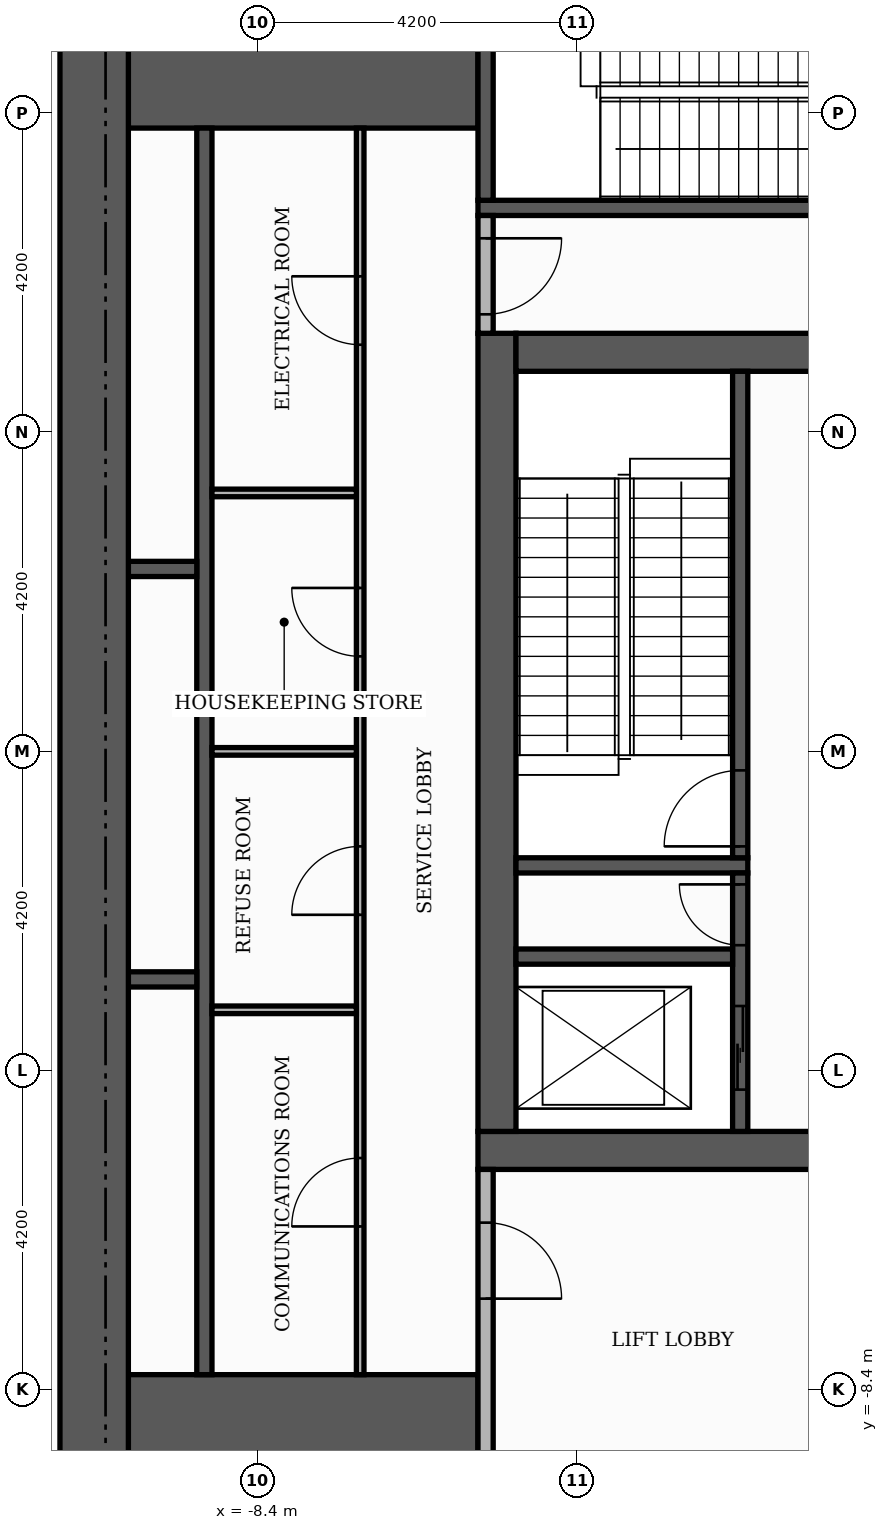
"""IFC4 building model, lengths in metres.
Left out: names, types, materials, properties, quantities, classifications, styles, units other than length and angle.
Written with IfcOpenShell. Run it as: python <this file> out.ifc"""

import sys

from ifc_helpers import new_model, si_unit, direction, frame, frame_2d, origin, place, context, subcontext, project, spatial, rectangle, extrude, element, fill, save


model = new_model("IFC4")
c1 = context("Model", 3, precision=1e-05, world=origin(), true_north=direction((0.0, 1.0)))
c2 = subcontext(c1, "Body", "Model", "MODEL_VIEW")
j1 = project(units=[si_unit("LENGTHUNIT", "METRE"), si_unit("PLANEANGLEUNIT", "RADIAN")], contexts=[c1])
p1 = place(None, origin())
s1 = spatial("IfcSite", under=j1, at=p1, CompositionType="ELEMENT")
p2 = place(p1, origin())
s2 = spatial("IfcBuilding", under=s1, at=p2, CompositionType="ELEMENT")
p3 = place(p2, frame((0.0, 0.0, 287.4)))
s3 = spatial("IfcBuildingStorey", under=s2, at=p3, CompositionType="ELEMENT", Elevation=287.4)
p4 = place(p3, frame((-5.5, -5.25, 0.0), z_axis=(0.0, 0.0, 1.0), x_axis=(1.0, 0.0, 0.0)))
e1 = element("IfcWall", 1, at=p4, inside=s3, PredefinedType="SHEAR", context=c2, shape_type="SweptSolid", body=[
    extrude(rectangle(XDim=11.0, YDim=0.5, at=frame_2d((5.5, 0.0))), origin(), (0.0, 0.0, 1.0), 5.05),
])
p5 = place(p4, frame((4.9, 0.0, 0.0)))
e2 = element("IfcOpeningElement", 2, at=p5, cuts=e1, PredefinedType="OPENING", context=c2, shape_type="SweptSolid", body=[
    extrude(rectangle(XDim=1.2, YDim=2.1, at=frame_2d((0.6, 1.05))), frame((0.0, 0.26, 0.0), z_axis=(0.0, -1.0, 0.0), x_axis=(1.0, 0.0, 0.0)), (0.0, 0.0, 1.0), 0.52),
])
p6 = place(p3, frame((-5.25, -5.0, 0.0), z_axis=(0.0, 0.0, 1.0), x_axis=(0.0, 1.0, 0.0)))
e3 = element("IfcWall", 3, at=p6, inside=s3, PredefinedType="SHEAR", context=c2, shape_type="SweptSolid", body=[
    extrude(rectangle(XDim=10.5, YDim=0.5, at=frame_2d((5.25, 0.0))), origin(), (0.0, 0.0, 1.0), 5.05),
])
p7 = place(p3, frame((-5.0, 5.25, 0.0), z_axis=(0.0, 0.0, 1.0), x_axis=(1.0, 0.0, 0.0)))
e4 = element("IfcWall", 4, at=p7, inside=s3, PredefinedType="SHEAR", context=c2, shape_type="SweptSolid", body=[
    extrude(rectangle(XDim=10.0, YDim=0.5, at=frame_2d((5.0, 0.0))), origin(), (0.0, 0.0, 1.0), 5.05),
])
p8 = place(p7, frame((4.4, 0.0, 0.0)))
e5 = element("IfcOpeningElement", 5, at=p8, cuts=e4, PredefinedType="OPENING", context=c2, shape_type="SweptSolid", body=[
    extrude(rectangle(XDim=1.2, YDim=2.1, at=frame_2d((0.6, 1.05))), frame((0.0, 0.26, 0.0), z_axis=(0.0, -1.0, 0.0), x_axis=(1.0, 0.0, 0.0)), (0.0, 0.0, 1.0), 0.52),
])
for number, where, z_axis, x_axis in (
    (6, (-10.1, -9.15, 0.0), (0.0, 0.0, 1.0), (1.0, 0.0, 0.0)),
    (7, (-10.1, 9.15, 0.0), (0.0, 0.0, 1.0), (1.0, 0.0, 0.0)),
):
    element("IfcWall", number, at=place(p3, frame(where, z_axis=z_axis, x_axis=x_axis)), inside=s3, PredefinedType="SHEAR", context=c2, shape_type="SweptSolid", body=[
        extrude(rectangle(XDim=4.6, YDim=1.9, at=frame_2d((2.3, 0.0))), origin(), (0.0, 0.0, 1.0), 5.05),
    ])
p9 = place(p3, frame((-5.0, -1.5, 0.0), z_axis=(0.0, 0.0, 1.0), x_axis=(1.0, 0.0, 0.0)))
e8 = element("IfcWall", 8, at=p9, inside=s3, PredefinedType="SHEAR", context=c2, shape_type="SweptSolid", body=[
    extrude(rectangle(XDim=3.05, YDim=0.2, at=frame_2d((1.525, 0.0))), origin(), (0.0, 0.0, 1.0), 5.05),
])
p10 = place(p3, frame((-2.05, -1.4, 0.0), z_axis=(0.0, 0.0, 1.0), x_axis=(0.0, 1.0, 0.0)))
e9 = element("IfcWall", 9, at=p10, inside=s3, PredefinedType="SHEAR", context=c2, shape_type="SweptSolid", body=[
    extrude(rectangle(XDim=6.4, YDim=0.2, at=frame_2d((3.2, 0.0))), origin(), (0.0, 0.0, 1.0), 5.05),
])
p11 = place(p10, frame((0.15, 0.0, 0.0)))
e10 = element("IfcOpeningElement", 10, at=p11, cuts=e9, PredefinedType="OPENING", context=c2, shape_type="SweptSolid", body=[
    extrude(rectangle(XDim=1.0, YDim=2.1, at=frame_2d((0.5, 1.05))), frame((0.0, 0.11, 0.0), z_axis=(0.0, -1.0, 0.0), x_axis=(1.0, 0.0, 0.0)), (0.0, 0.0, 1.0), 0.22),
])
p12 = place(p3, frame((-5.5, 7.15, 0.0), z_axis=(0.0, 0.0, 1.0), x_axis=(1.0, 0.0, 0.0)))
e11 = element("IfcWall", 11, at=p12, inside=s3, PredefinedType="SHEAR", context=c2, shape_type="SweptSolid", body=[
    extrude(rectangle(XDim=6.8, YDim=0.2, at=frame_2d((3.4, 0.0))), origin(), (0.0, 0.0, 1.0), 5.05),
])
p13 = place(p3, frame((-5.4, 7.25, 0.0), z_axis=(0.0, 0.0, 1.0), x_axis=(0.0, 1.0, 0.0)))
e12 = element("IfcWall", 12, at=p13, inside=s3, PredefinedType="SHEAR", context=c2, shape_type="SweptSolid", body=[
    extrude(rectangle(XDim=2.85, YDim=0.2, at=frame_2d((1.425, 0.0))), origin(), (0.0, 0.0, 1.0), 5.05),
])
p14 = place(p3, frame((-9.1, -8.2, 0.0), z_axis=(0.0, 0.0, 1.0), x_axis=(0.0, 1.0, 0.0)))
e13 = element("IfcWall", 13, at=p14, inside=s3, PredefinedType="SHEAR", context=c2, shape_type="SweptSolid", body=[
    extrude(rectangle(XDim=16.4, YDim=0.2, at=frame_2d((8.2, 0.0))), origin(), (0.0, 0.0, 1.0), 5.05),
])
p15 = place(p3, frame((-2.05, -5.0, 0.0), z_axis=(0.0, 0.0, 1.0), x_axis=(0.0, 1.0, 0.0)))
e14 = element("IfcWall", 14, at=p15, inside=s3, PredefinedType="SHEAR", context=c2, shape_type="SweptSolid", body=[
    extrude(rectangle(XDim=3.4, YDim=0.2, at=frame_2d((1.7, 0.0))), origin(), (0.0, 0.0, 1.0), 5.05),
])
p16 = place(p15, frame((0.55, 0.0, 0.0)))
e15 = element("IfcOpeningElement", 15, at=p16, cuts=e14, PredefinedType="OPENING", context=c2, shape_type="SweptSolid", body=[
    extrude(rectangle(XDim=1.1, YDim=2.1, at=frame_2d((0.55, 1.05))), frame((0.0, 0.11, 0.0), z_axis=(0.0, -1.0, 0.0), x_axis=(1.0, 0.0, 0.0)), (0.0, 0.0, 1.0), 0.22),
])
p17 = place(p15, frame((2.45, 0.0, 0.0)))
e16 = element("IfcOpeningElement", 16, at=p17, cuts=e14, PredefinedType="OPENING", context=c2, shape_type="SweptSolid", body=[
    extrude(rectangle(XDim=0.8, YDim=2.1, at=frame_2d((0.4, 1.05))), frame((0.0, 0.11, 0.0), z_axis=(0.0, -1.0, 0.0), x_axis=(1.0, 0.0, 0.0)), (0.0, 0.0, 1.0), 0.22),
])
p18 = place(p3, frame((-10.1, -3.0, 0.0), z_axis=(0.0, 0.0, 1.0), x_axis=(1.0, 0.0, 0.0)))
e17 = element("IfcWall", 17, at=p18, inside=s3, PredefinedType="SHEAR", context=c2, shape_type="SweptSolid", body=[
    extrude(rectangle(XDim=0.9, YDim=0.2, at=frame_2d((0.45, 0.0))), origin(), (0.0, 0.0, 1.0), 5.05),
])
p19 = place(p3, frame((-5.0, -2.7, 0.0), z_axis=(0.0, 0.0, 1.0), x_axis=(1.0, 0.0, 0.0)))
e18 = element("IfcWall", 18, at=p19, inside=s3, PredefinedType="SHEAR", context=c2, shape_type="SweptSolid", body=[
    extrude(rectangle(XDim=2.85, YDim=0.2, at=frame_2d((1.425, 0.0))), origin(), (0.0, 0.0, 1.0), 5.05),
])
p20 = place(p3, frame((-10.1, 2.4, 0.0), z_axis=(0.0, 0.0, 1.0), x_axis=(1.0, 0.0, 0.0)))
e19 = element("IfcWall", 19, at=p20, inside=s3, PredefinedType="SHEAR", context=c2, shape_type="SweptSolid", body=[
    extrude(rectangle(XDim=0.9, YDim=0.2, at=frame_2d((0.45, 0.0))), origin(), (0.0, 0.0, 1.0), 5.05),
])
p21 = place(p3, frame((-10.55, -10.1, 0.0), z_axis=(0.0, 0.0, 1.0), x_axis=(0.0, 1.0, 0.0)))
e20 = element("IfcWall", 20, at=p21, inside=s3, PredefinedType="SHEAR", context=c2, shape_type="SweptSolid", body=[
    extrude(rectangle(XDim=20.2, YDim=0.9, at=frame_2d((10.1, 0.0))), origin(), (0.0, 0.0, 1.0), 5.05),
])
p22 = place(p3, frame((-5.4, -10.1, 0.0), z_axis=(0.0, 0.0, 1.0), x_axis=(0.0, 1.0, 0.0)))
e21 = element("IfcWall", 21, at=p22, inside=s3, PredefinedType="PARTITIONING", context=c2, shape_type="SweptSolid", body=[
    extrude(rectangle(XDim=4.6, YDim=0.2, at=frame_2d((2.3, 0.0))), origin(), (0.0, 0.0, 1.0), 5.05),
])
p23 = place(p22, frame((2.9, 0.0, 0.0)))
e22 = element("IfcOpeningElement", 22, at=p23, cuts=e21, PredefinedType="OPENING", context=c2, shape_type="SweptSolid", body=[
    extrude(rectangle(XDim=1.0, YDim=2.1, at=frame_2d((0.5, 1.05))), frame((0.0, 0.11, 0.0), z_axis=(0.0, -1.0, 0.0), x_axis=(1.0, 0.0, 0.0)), (0.0, 0.0, 1.0), 0.22),
])
p24 = place(p3, frame((-7.05, -8.2, 0.0), z_axis=(0.0, 0.0, 1.0), x_axis=(0.0, 1.0, 0.0)))
e23 = element("IfcWall", 23, at=p24, inside=s3, PredefinedType="PARTITIONING", context=c2, shape_type="SweptSolid", body=[
    extrude(rectangle(XDim=16.4, YDim=0.1, at=frame_2d((8.2, 0.0))), origin(), (0.0, 0.0, 1.0), 5.05),
])
p25 = place(p24, frame((1.95, 0.0, 0.0)))
e24 = element("IfcOpeningElement", 24, at=p25, cuts=e23, PredefinedType="OPENING", context=c2, shape_type="SweptSolid", body=[
    extrude(rectangle(XDim=0.9, YDim=2.1, at=frame_2d((0.45, 1.05))), frame((0.0, 0.06, 0.0), z_axis=(0.0, -1.0, 0.0), x_axis=(1.0, 0.0, 0.0)), (0.0, 0.0, 1.0), 0.12),
])
p26 = place(p24, frame((6.05, 0.0, 0.0)))
e25 = element("IfcOpeningElement", 25, at=p26, cuts=e23, PredefinedType="OPENING", context=c2, shape_type="SweptSolid", body=[
    extrude(rectangle(XDim=0.9, YDim=2.1, at=frame_2d((0.45, 1.05))), frame((0.0, 0.06, 0.0), z_axis=(0.0, -1.0, 0.0), x_axis=(1.0, 0.0, 0.0)), (0.0, 0.0, 1.0), 0.12),
])
p27 = place(p24, frame((9.45, 0.0, 0.0)))
e26 = element("IfcOpeningElement", 26, at=p27, cuts=e23, PredefinedType="OPENING", context=c2, shape_type="SweptSolid", body=[
    extrude(rectangle(XDim=0.9, YDim=2.1, at=frame_2d((0.45, 1.05))), frame((0.0, 0.06, 0.0), z_axis=(0.0, -1.0, 0.0), x_axis=(1.0, 0.0, 0.0)), (0.0, 0.0, 1.0), 0.12),
])
p28 = place(p24, frame((13.55, 0.0, 0.0)))
e27 = element("IfcOpeningElement", 27, at=p28, cuts=e23, PredefinedType="OPENING", context=c2, shape_type="SweptSolid", body=[
    extrude(rectangle(XDim=0.9, YDim=2.1, at=frame_2d((0.45, 1.05))), frame((0.0, 0.06, 0.0), z_axis=(0.0, -1.0, 0.0), x_axis=(1.0, 0.0, 0.0)), (0.0, 0.0, 1.0), 0.12),
])
for number, where, z_axis, x_axis in (
    (28, (-9.0, -3.4, 0.0), (0.0, 0.0, 1.0), (1.0, 0.0, 0.0)),
    (29, (-9.0, 0.0, 0.0), (0.0, 0.0, 1.0), (1.0, 0.0, 0.0)),
    (30, (-9.0, 3.4, 0.0), (0.0, 0.0, 1.0), (1.0, 0.0, 0.0)),
):
    element("IfcWall", number, at=place(p3, frame(where, z_axis=z_axis, x_axis=x_axis)), inside=s3, PredefinedType="PARTITIONING", context=c2, shape_type="SweptSolid", body=[
        extrude(rectangle(XDim=1.9, YDim=0.1, at=frame_2d((0.95, 0.0))), origin(), (0.0, 0.0, 1.0), 5.05),
    ])
p29 = place(p3, frame((-5.4, 5.5, 0.0), z_axis=(0.0, 0.0, 1.0), x_axis=(0.0, 1.0, 0.0)))
e31 = element("IfcWall", 31, at=p29, inside=s3, PredefinedType="PARTITIONING", context=c2, shape_type="SweptSolid", body=[
    extrude(rectangle(XDim=1.55, YDim=0.2, at=frame_2d((0.775, 0.0))), origin(), (0.0, 0.0, 1.0), 5.05),
])
p30 = place(p29, frame((0.25, 0.0, 0.0)))
e32 = element("IfcOpeningElement", 32, at=p30, cuts=e31, PredefinedType="OPENING", context=c2, shape_type="SweptSolid", body=[
    extrude(rectangle(XDim=1.0, YDim=2.1, at=frame_2d((0.5, 1.05))), frame((0.0, 0.11, 0.0), z_axis=(0.0, -1.0, 0.0), x_axis=(1.0, 0.0, 0.0)), (0.0, 0.0, 1.0), 0.22),
])
p31 = place(p16, origin())
e33 = element("IfcDoor", 33, at=p31, inside=s3, OperationType="SLIDING_TO_LEFT", PredefinedType="DOOR", context=c2, shape_type="SweptSolid", body=[
    extrude(rectangle(XDim=1.1, YDim=2.1, at=frame_2d((0.55, 1.05))), frame((0.0, 0.025, 0.0), z_axis=(0.0, -1.0, 0.0), x_axis=(1.0, 0.0, 0.0)), (0.0, 0.0, 1.0), 0.05),
])
fill(e15, e33)
p32 = place(p11, origin())
e34 = element("IfcDoor", 34, at=p32, inside=s3, OperationType="SINGLE_SWING_LEFT", PredefinedType="DOOR", context=c2, shape_type="SweptSolid", body=[
    extrude(rectangle(XDim=1.0, YDim=2.1, at=frame_2d((0.5, 1.05))), frame((0.0, 0.025, 0.0), z_axis=(0.0, -1.0, 0.0), x_axis=(1.0, 0.0, 0.0)), (0.0, 0.0, 1.0), 0.05),
])
fill(e10, e34)
p33 = place(p17, origin())
e35 = element("IfcDoor", 35, at=p33, inside=s3, OperationType="SINGLE_SWING_RIGHT", PredefinedType="DOOR", context=c2, shape_type="SweptSolid", body=[
    extrude(rectangle(XDim=0.8, YDim=2.1, at=frame_2d((0.4, 1.05))), frame((0.0, 0.025, 0.0), z_axis=(0.0, -1.0, 0.0), x_axis=(1.0, 0.0, 0.0)), (0.0, 0.0, 1.0), 0.05),
])
fill(e16, e35)
p34 = place(p30, frame((1.0, 0.0, 0.0), z_axis=(0.0, 0.0, 1.0), x_axis=(-1.0, 0.0, 0.0)))
e36 = element("IfcDoor", 36, at=p34, inside=s3, OperationType="SINGLE_SWING_RIGHT", PredefinedType="DOOR", context=c2, shape_type="SweptSolid", body=[
    extrude(rectangle(XDim=1.0, YDim=2.1, at=frame_2d((0.5, 1.05))), frame((0.0, 0.025, 0.0), z_axis=(0.0, -1.0, 0.0), x_axis=(1.0, 0.0, 0.0)), (0.0, 0.0, 1.0), 0.05),
])
fill(e32, e36)
p35 = place(p23, frame((1.0, 0.0, 0.0), z_axis=(0.0, 0.0, 1.0), x_axis=(-1.0, 0.0, 0.0)))
e37 = element("IfcDoor", 37, at=p35, inside=s3, OperationType="SINGLE_SWING_LEFT", PredefinedType="DOOR", context=c2, shape_type="SweptSolid", body=[
    extrude(rectangle(XDim=1.0, YDim=2.1, at=frame_2d((0.5, 1.05))), frame((0.0, 0.025, 0.0), z_axis=(0.0, -1.0, 0.0), x_axis=(1.0, 0.0, 0.0)), (0.0, 0.0, 1.0), 0.05),
])
fill(e22, e37)
p36 = place(p25, origin())
e38 = element("IfcDoor", 38, at=p36, inside=s3, OperationType="SINGLE_SWING_LEFT", PredefinedType="DOOR", context=c2, shape_type="SweptSolid", body=[
    extrude(rectangle(XDim=0.9, YDim=2.1, at=frame_2d((0.45, 1.05))), frame((0.0, 0.025, 0.0), z_axis=(0.0, -1.0, 0.0), x_axis=(1.0, 0.0, 0.0)), (0.0, 0.0, 1.0), 0.05),
])
fill(e24, e38)
p37 = place(p26, origin())
e39 = element("IfcDoor", 39, at=p37, inside=s3, OperationType="SINGLE_SWING_LEFT", PredefinedType="DOOR", context=c2, shape_type="SweptSolid", body=[
    extrude(rectangle(XDim=0.9, YDim=2.1, at=frame_2d((0.45, 1.05))), frame((0.0, 0.025, 0.0), z_axis=(0.0, -1.0, 0.0), x_axis=(1.0, 0.0, 0.0)), (0.0, 0.0, 1.0), 0.05),
])
fill(e25, e39)
p38 = place(p27, origin())
e40 = element("IfcDoor", 40, at=p38, inside=s3, OperationType="SINGLE_SWING_RIGHT", PredefinedType="DOOR", context=c2, shape_type="SweptSolid", body=[
    extrude(rectangle(XDim=0.9, YDim=2.1, at=frame_2d((0.45, 1.05))), frame((0.0, 0.025, 0.0), z_axis=(0.0, -1.0, 0.0), x_axis=(1.0, 0.0, 0.0)), (0.0, 0.0, 1.0), 0.05),
])
fill(e26, e40)
p39 = place(p28, origin())
e41 = element("IfcDoor", 41, at=p39, inside=s3, OperationType="SINGLE_SWING_RIGHT", PredefinedType="DOOR", context=c2, shape_type="SweptSolid", body=[
    extrude(rectangle(XDim=0.9, YDim=2.1, at=frame_2d((0.45, 1.05))), frame((0.0, 0.025, 0.0), z_axis=(0.0, -1.0, 0.0), x_axis=(1.0, 0.0, 0.0)), (0.0, 0.0, 1.0), 0.05),
])
fill(e27, e41)
save(model, sys.argv[1])
